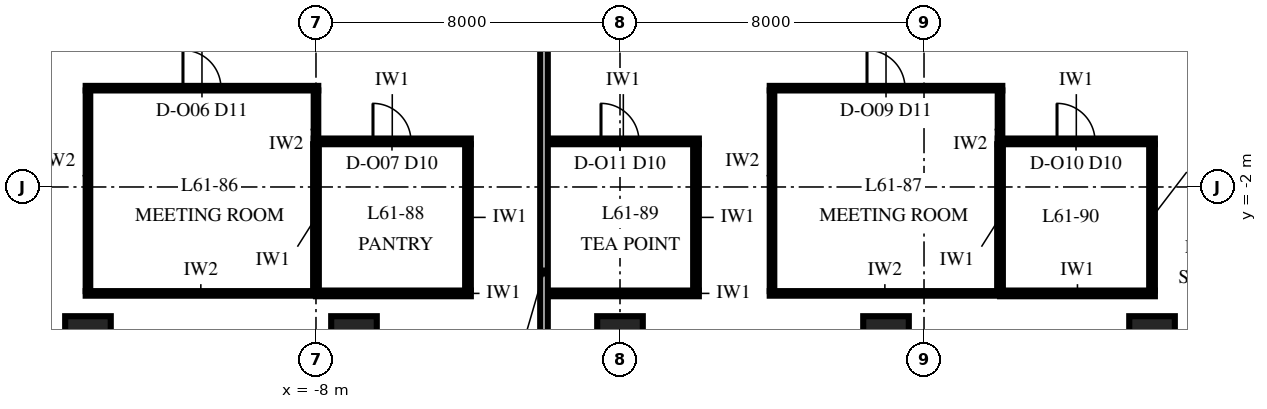
"""IFC4 building model, lengths in metres.
Left out: names, types, materials, properties, quantities, classifications, styles, units other than length and angle.
Written with IfcOpenShell. Run it as: python <this file> out.ifc"""

import sys

from ifc_helpers import new_model, si_unit, direction, frame, frame_2d, origin, origin_2d, place, context, subcontext, project, spatial, rectangle, extrude, element, fill, save


model = new_model("IFC4")
c1 = context("Model", 3, precision=1e-05, world=origin(), true_north=direction((0.0, 1.0)))
c2 = subcontext(c1, "Body", "Model", "MODEL_VIEW")
j1 = project(units=[si_unit("LENGTHUNIT", "METRE"), si_unit("PLANEANGLEUNIT", "RADIAN")], contexts=[c1])
p1 = place(None, origin())
s1 = spatial("IfcSite", under=j1, at=p1, CompositionType="ELEMENT")
p2 = place(p1, origin())
s2 = spatial("IfcBuilding", under=s1, at=p2, CompositionType="ELEMENT")
p3 = place(p2, frame((0.0, 0.0, 264.0)))
s3 = spatial("IfcBuildingStorey", under=s2, at=p3, CompositionType="ELEMENT", Elevation=264.0)
for number, where, z_axis, x_axis in (
    (1, (-14.0, -6.0, 0.0), (0.0, 0.0, 1.0), (1.0, 0.0, 0.0)),
    (2, (-7.0, -6.0, 0.0), (0.0, 0.0, 1.0), (1.0, 0.0, 0.0)),
    (3, (0.0, -6.0, 0.0), (0.0, 0.0, 1.0), (1.0, 0.0, 0.0)),
    (4, (7.0, -6.0, 0.0), (0.0, 0.0, 1.0), (1.0, 0.0, 0.0)),
    (5, (14.0, -6.0, 0.0), (0.0, 0.0, 1.0), (1.0, 0.0, 0.0)),
):
    element("IfcColumn", number, at=place(p3, frame(where, z_axis=z_axis, x_axis=x_axis)), inside=s3, PredefinedType="COLUMN", context=c2, shape_type="SweptSolid", body=[
        extrude(rectangle(XDim=1.2, YDim=1.2, at=origin_2d()), origin(), (0.0, 0.0, 1.0), 4.0),
    ])
p4 = place(p3, frame((-14.06, -4.8, 0.0), z_axis=(0.0, 0.0, 1.0), x_axis=(1.0, 0.0, 0.0)))
e6 = element("IfcWall", 6, at=p4, inside=s3, PredefinedType="PARTITIONING", context=c2, shape_type="SweptSolid", body=[
    extrude(rectangle(XDim=6.06, YDim=0.12, at=frame_2d((3.03, 0.0))), origin(), (0.0, 0.0, 1.0), 3.23),
])
p5 = place(p3, frame((-8.0, -4.8, 0.0), z_axis=(0.0, 0.0, 1.0), x_axis=(1.0, 0.0, 0.0)))
e7 = element("IfcWall", 7, at=p5, inside=s3, PredefinedType="PARTITIONING", context=c2, shape_type="SweptSolid", body=[
    extrude(rectangle(XDim=4.075, YDim=0.15, at=frame_2d((2.038, 0.0))), origin(), (0.0, 0.0, 1.0), 3.23),
])
p6 = place(p3, frame((-1.9, -4.8, 0.0), z_axis=(0.0, 0.0, 1.0), x_axis=(1.0, 0.0, 0.0)))
e8 = element("IfcWall", 8, at=p6, inside=s3, PredefinedType="PARTITIONING", context=c2, shape_type="SweptSolid", body=[
    extrude(rectangle(XDim=3.975, YDim=0.15, at=frame_2d((1.987, 0.0))), origin(), (0.0, 0.0, 1.0), 3.23),
])
p7 = place(p3, frame((3.94, -4.8, 0.0), z_axis=(0.0, 0.0, 1.0), x_axis=(1.0, 0.0, 0.0)))
e9 = element("IfcWall", 9, at=p7, inside=s3, PredefinedType="PARTITIONING", context=c2, shape_type="SweptSolid", body=[
    extrude(rectangle(XDim=6.06, YDim=0.12, at=frame_2d((3.03, 0.0))), origin(), (0.0, 0.0, 1.0), 3.23),
])
p8 = place(p3, frame((10.0, -4.8, 0.0), z_axis=(0.0, 0.0, 1.0), x_axis=(1.0, 0.0, 0.0)))
e10 = element("IfcWall", 10, at=p8, inside=s3, PredefinedType="PARTITIONING", context=c2, shape_type="SweptSolid", body=[
    extrude(rectangle(XDim=4.075, YDim=0.15, at=frame_2d((2.038, 0.0))), origin(), (0.0, 0.0, 1.0), 3.23),
])
p9 = place(p3, frame((-8.06, -0.8, 0.0), z_axis=(0.0, 0.0, 1.0), x_axis=(1.0, 0.0, 0.0)))
e11 = element("IfcWall", 11, at=p9, inside=s3, PredefinedType="PARTITIONING", context=c2, shape_type="SweptSolid", body=[
    extrude(rectangle(XDim=4.135, YDim=0.15, at=frame_2d((2.067, 0.0))), origin(), (0.0, 0.0, 1.0), 3.23),
])
p10 = place(p9, frame((1.56, 0.0, 0.0)))
e12 = element("IfcOpeningElement", 12, at=p10, cuts=e11, PredefinedType="OPENING", context=c2, shape_type="SweptSolid", body=[
    extrude(rectangle(XDim=1.0, YDim=2.3, at=frame_2d((0.5, 1.15))), frame((0.0, 0.09, 0.0), z_axis=(0.0, -1.0, 0.0), x_axis=(1.0, 0.0, 0.0)), (0.0, 0.0, 1.0), 0.18),
])
p11 = place(p3, frame((-1.9, -0.8, 0.0), z_axis=(0.0, 0.0, 1.0), x_axis=(1.0, 0.0, 0.0)))
e13 = element("IfcWall", 13, at=p11, inside=s3, PredefinedType="PARTITIONING", context=c2, shape_type="SweptSolid", body=[
    extrude(rectangle(XDim=3.975, YDim=0.15, at=frame_2d((1.987, 0.0))), origin(), (0.0, 0.0, 1.0), 3.85),
])
p12 = place(p11, frame((1.4, 0.0, 0.0)))
e14 = element("IfcOpeningElement", 14, at=p12, cuts=e13, PredefinedType="OPENING", context=c2, shape_type="SweptSolid", body=[
    extrude(rectangle(XDim=1.0, YDim=2.3, at=frame_2d((0.5, 1.15))), frame((0.0, 0.09, 0.0), z_axis=(0.0, -1.0, 0.0), x_axis=(1.0, 0.0, 0.0)), (0.0, 0.0, 1.0), 0.18),
])
p13 = place(p3, frame((9.94, -0.8, 0.0), z_axis=(0.0, 0.0, 1.0), x_axis=(1.0, 0.0, 0.0)))
e15 = element("IfcWall", 15, at=p13, inside=s3, PredefinedType="PARTITIONING", context=c2, shape_type="SweptSolid", body=[
    extrude(rectangle(XDim=4.135, YDim=0.15, at=frame_2d((2.067, 0.0))), origin(), (0.0, 0.0, 1.0), 3.23),
])
p14 = place(p13, frame((1.56, 0.0, 0.0)))
e16 = element("IfcOpeningElement", 16, at=p14, cuts=e15, PredefinedType="OPENING", context=c2, shape_type="SweptSolid", body=[
    extrude(rectangle(XDim=1.0, YDim=2.3, at=frame_2d((0.5, 1.15))), frame((0.0, 0.09, 0.0), z_axis=(0.0, -1.0, 0.0), x_axis=(1.0, 0.0, 0.0)), (0.0, 0.0, 1.0), 0.18),
])
p15 = place(p3, frame((-14.06, 0.6, 0.0), z_axis=(0.0, 0.0, 1.0), x_axis=(1.0, 0.0, 0.0)))
e17 = element("IfcWall", 17, at=p15, inside=s3, PredefinedType="PARTITIONING", context=c2, shape_type="SweptSolid", body=[
    extrude(rectangle(XDim=6.12, YDim=0.12, at=frame_2d((3.06, 0.0))), origin(), (0.0, 0.0, 1.0), 3.23),
])
p16 = place(p15, frame((2.56, 0.0, 0.0)))
e18 = element("IfcOpeningElement", 18, at=p16, cuts=e17, PredefinedType="OPENING", context=c2, shape_type="SweptSolid", body=[
    extrude(rectangle(XDim=1.0, YDim=2.4, at=frame_2d((0.5, 1.2))), frame((0.0, 0.075, 0.0), z_axis=(0.0, -1.0, 0.0), x_axis=(1.0, 0.0, 0.0)), (0.0, 0.0, 1.0), 0.15),
])
p17 = place(p3, frame((3.94, 0.6, 0.0), z_axis=(0.0, 0.0, 1.0), x_axis=(1.0, 0.0, 0.0)))
e19 = element("IfcWall", 19, at=p17, inside=s3, PredefinedType="PARTITIONING", context=c2, shape_type="SweptSolid", body=[
    extrude(rectangle(XDim=6.12, YDim=0.12, at=frame_2d((3.06, 0.0))), origin(), (0.0, 0.0, 1.0), 3.23),
])
p18 = place(p17, frame((2.56, 0.0, 0.0)))
e20 = element("IfcOpeningElement", 20, at=p18, cuts=e19, PredefinedType="OPENING", context=c2, shape_type="SweptSolid", body=[
    extrude(rectangle(XDim=1.0, YDim=2.4, at=frame_2d((0.5, 1.2))), frame((0.0, 0.075, 0.0), z_axis=(0.0, -1.0, 0.0), x_axis=(1.0, 0.0, 0.0)), (0.0, 0.0, 1.0), 0.15),
])
p19 = place(p3, frame((-14.0, -4.74, 0.0), z_axis=(0.0, 0.0, 1.0), x_axis=(0.0, 1.0, 0.0)))
e21 = element("IfcWall", 21, at=p19, inside=s3, PredefinedType="PARTITIONING", context=c2, shape_type="SweptSolid", body=[
    extrude(rectangle(XDim=5.28, YDim=0.12, at=frame_2d((2.64, 0.0))), origin(), (0.0, 0.0, 1.0), 3.23),
])
p20 = place(p3, frame((-8.0, -4.725, 0.0), z_axis=(0.0, 0.0, 1.0), x_axis=(0.0, 1.0, 0.0)))
e22 = element("IfcWall", 22, at=p20, inside=s3, PredefinedType="PARTITIONING", context=c2, shape_type="SweptSolid", body=[
    extrude(rectangle(XDim=3.85, YDim=0.15, at=frame_2d((1.925, 0.0))), origin(), (0.0, 0.0, 1.0), 3.85),
])
p21 = place(p3, frame((-8.0, -0.725, 0.0), z_axis=(0.0, 0.0, 1.0), x_axis=(0.0, 1.0, 0.0)))
e23 = element("IfcWall", 23, at=p21, inside=s3, PredefinedType="PARTITIONING", context=c2, shape_type="SweptSolid", body=[
    extrude(rectangle(XDim=1.265, YDim=0.12, at=frame_2d((0.633, 0.0))), origin(), (0.0, 0.0, 1.0), 3.85),
])
p22 = place(p3, frame((-4.0, -4.725, 0.0), z_axis=(0.0, 0.0, 1.0), x_axis=(0.0, 1.0, 0.0)))
e24 = element("IfcWall", 24, at=p22, inside=s3, PredefinedType="PARTITIONING", context=c2, shape_type="SweptSolid", body=[
    extrude(rectangle(XDim=3.85, YDim=0.15, at=frame_2d((1.925, 0.0))), origin(), (0.0, 0.0, 1.0), 3.85),
])
p23 = place(p3, frame((-2.0, -12.325, 0.0), z_axis=(0.0, 0.0, 1.0), x_axis=(0.0, 1.0, 0.0)))
e25 = element("IfcWall", 25, at=p23, inside=s3, PredefinedType="PARTITIONING", context=c2, shape_type="SweptSolid", body=[
    extrude(rectangle(XDim=16.175, YDim=0.2, at=frame_2d((8.087, 0.0))), origin(), (0.0, 0.0, 1.0), 2.842),
])
p24 = place(p3, frame((2.0, -4.725, 0.0), z_axis=(0.0, 0.0, 1.0), x_axis=(0.0, 1.0, 0.0)))
e26 = element("IfcWall", 26, at=p24, inside=s3, PredefinedType="PARTITIONING", context=c2, shape_type="SweptSolid", body=[
    extrude(rectangle(XDim=3.85, YDim=0.15, at=frame_2d((1.925, 0.0))), origin(), (0.0, 0.0, 1.0), 3.23),
])
p25 = place(p3, frame((4.0, -4.74, 0.0), z_axis=(0.0, 0.0, 1.0), x_axis=(0.0, 1.0, 0.0)))
e27 = element("IfcWall", 27, at=p25, inside=s3, PredefinedType="PARTITIONING", context=c2, shape_type="SweptSolid", body=[
    extrude(rectangle(XDim=5.28, YDim=0.12, at=frame_2d((2.64, 0.0))), origin(), (0.0, 0.0, 1.0), 3.85),
])
p26 = place(p3, frame((10.0, -4.725, 0.0), z_axis=(0.0, 0.0, 1.0), x_axis=(0.0, 1.0, 0.0)))
e28 = element("IfcWall", 28, at=p26, inside=s3, PredefinedType="PARTITIONING", context=c2, shape_type="SweptSolid", body=[
    extrude(rectangle(XDim=3.85, YDim=0.15, at=frame_2d((1.925, 0.0))), origin(), (0.0, 0.0, 1.0), 3.23),
])
p27 = place(p3, frame((10.0, -0.725, 0.0), z_axis=(0.0, 0.0, 1.0), x_axis=(0.0, 1.0, 0.0)))
e29 = element("IfcWall", 29, at=p27, inside=s3, PredefinedType="PARTITIONING", context=c2, shape_type="SweptSolid", body=[
    extrude(rectangle(XDim=1.265, YDim=0.12, at=frame_2d((0.633, 0.0))), origin(), (0.0, 0.0, 1.0), 3.85),
])
p28 = place(p3, frame((14.0, -4.725, 0.0), z_axis=(0.0, 0.0, 1.0), x_axis=(0.0, 1.0, 0.0)))
e30 = element("IfcWall", 30, at=p28, inside=s3, PredefinedType="PARTITIONING", context=c2, shape_type="SweptSolid", body=[
    extrude(rectangle(XDim=3.85, YDim=0.15, at=frame_2d((1.925, 0.0))), origin(), (0.0, 0.0, 1.0), 3.23),
])
p29 = place(p16, origin())
e31 = element("IfcDoor", 31, at=p29, inside=s3, OperationType="SINGLE_SWING_RIGHT", PredefinedType="DOOR", context=c2, shape_type="SweptSolid", body=[
    extrude(rectangle(XDim=1.0, YDim=2.4, at=frame_2d((0.5, 1.2))), frame((0.0, 0.06, 0.0), z_axis=(0.0, -1.0, 0.0), x_axis=(1.0, 0.0, 0.0)), (0.0, 0.0, 1.0), 0.12),
])
fill(e18, e31)
p30 = place(p10, origin())
e32 = element("IfcDoor", 32, at=p30, inside=s3, OperationType="SINGLE_SWING_LEFT", PredefinedType="DOOR", context=c2, shape_type="SweptSolid", body=[
    extrude(rectangle(XDim=1.0, YDim=2.3, at=frame_2d((0.5, 1.15))), frame((0.0, 0.075, 0.0), z_axis=(0.0, -1.0, 0.0), x_axis=(1.0, 0.0, 0.0)), (0.0, 0.0, 1.0), 0.149),
])
fill(e12, e32)
p31 = place(p18, origin())
e33 = element("IfcDoor", 33, at=p31, inside=s3, OperationType="SINGLE_SWING_RIGHT", PredefinedType="DOOR", context=c2, shape_type="SweptSolid", body=[
    extrude(rectangle(XDim=1.0, YDim=2.4, at=frame_2d((0.5, 1.2))), frame((0.0, 0.06, 0.0), z_axis=(0.0, -1.0, 0.0), x_axis=(1.0, 0.0, 0.0)), (0.0, 0.0, 1.0), 0.12),
])
fill(e20, e33)
p32 = place(p14, origin())
e34 = element("IfcDoor", 34, at=p32, inside=s3, OperationType="SINGLE_SWING_LEFT", PredefinedType="DOOR", context=c2, shape_type="SweptSolid", body=[
    extrude(rectangle(XDim=1.0, YDim=2.3, at=frame_2d((0.5, 1.15))), frame((0.0, 0.075, 0.0), z_axis=(0.0, -1.0, 0.0), x_axis=(1.0, 0.0, 0.0)), (0.0, 0.0, 1.0), 0.149),
])
fill(e16, e34)
p33 = place(p12, origin())
e35 = element("IfcDoor", 35, at=p33, inside=s3, OperationType="SINGLE_SWING_LEFT", PredefinedType="DOOR", context=c2, shape_type="SweptSolid", body=[
    extrude(rectangle(XDim=1.0, YDim=2.3, at=frame_2d((0.5, 1.15))), frame((0.0, 0.075, 0.0), z_axis=(0.0, -1.0, 0.0), x_axis=(1.0, 0.0, 0.0)), (0.0, 0.0, 1.0), 0.149),
])
fill(e14, e35)
save(model, sys.argv[1])
